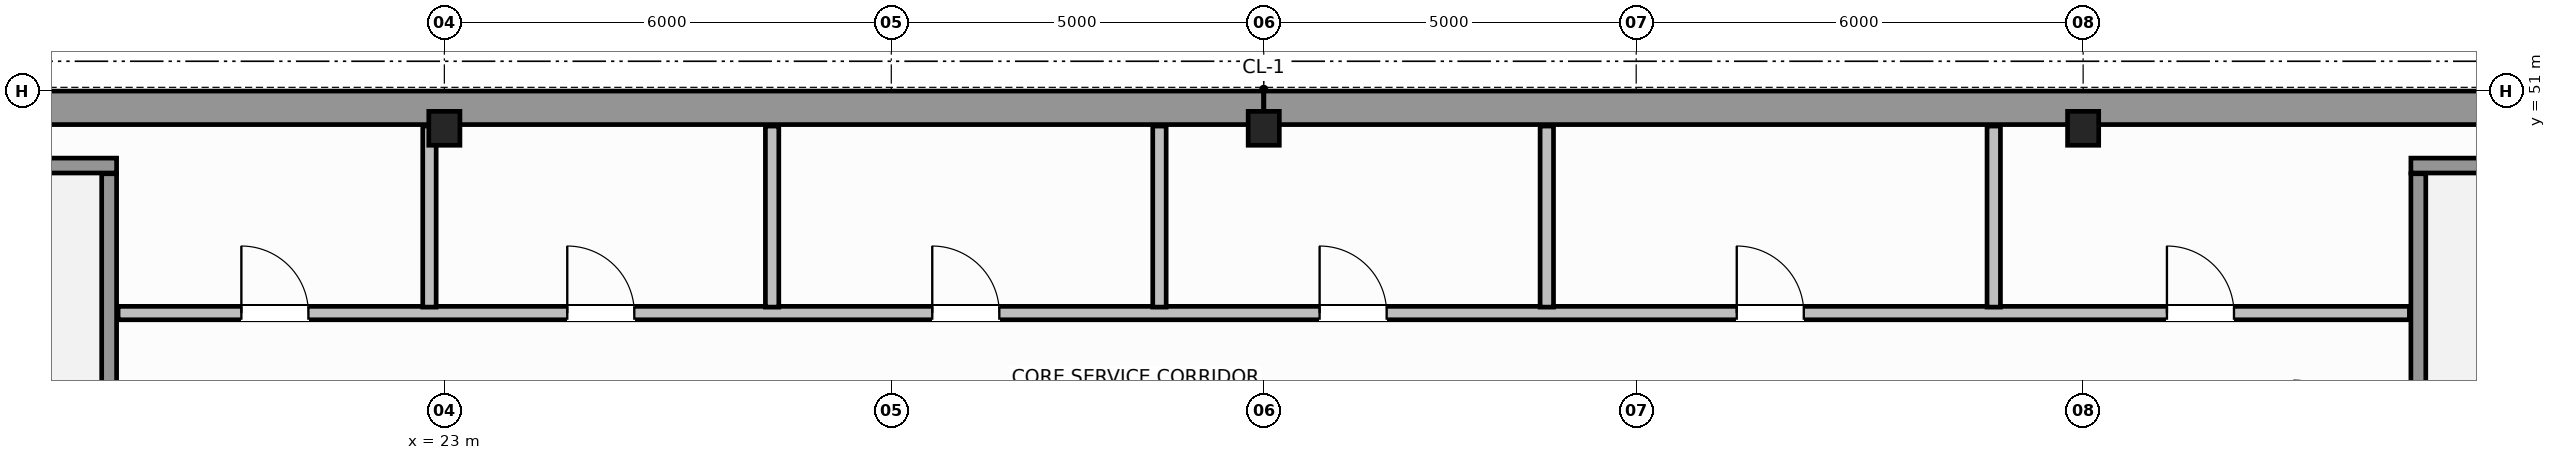
"""IFC4 building model, lengths in metres.
Left out: names, types, materials, properties, quantities, classifications, styles, units other than length and angle.
Written with IfcOpenShell. Run it as: python <this file> out.ifc"""

import sys

from ifc_helpers import new_model, si_unit, direction, frame, frame_2d, origin, origin_2d, place, context, subcontext, project, spatial, rectangle, i_section, extrude, source, transform, mapped, element, fill, save


model = new_model("IFC4")
c1 = context("Model", 3, precision=1e-05, world=origin(), true_north=direction((0.0, 1.0)))
c2 = subcontext(c1, "Body", "Model", "MODEL_VIEW")
j1 = project(units=[si_unit("LENGTHUNIT", "METRE"), si_unit("PLANEANGLEUNIT", "RADIAN")], contexts=[c1])
p1 = place(None, origin())
s1 = spatial("IfcSite", under=j1, at=p1, CompositionType="ELEMENT")
p2 = place(p1, origin())
s2 = spatial("IfcBuilding", under=s1, at=p2, CompositionType="ELEMENT")
p3 = place(p2, frame((0.0, 0.0, 249.8)))
s3 = spatial("IfcBuildingStorey", under=s2, at=p3, CompositionType="ELEMENT", Elevation=249.8)
m1 = source(origin(), c2, "Body", "SweptSolid", [
    extrude(i_section(OverallWidth=0.418, OverallDepth=0.455, WebThickness=0.042, FlangeThickness=0.058, FilletRadius=0.015, at=origin_2d()), origin(), (0.0, 0.0, 1.0), 3.8),
])
for number, where, z_axis, x_axis in (
    (1, (23.0, 50.5, 0.0), (0.0, 0.0, 1.0), (1.0, 0.0, 0.0)),
    (2, (34.0, 50.5, 0.0), (0.0, 0.0, 1.0), (1.0, 0.0, 0.0)),
    (3, (45.0, 50.5, 0.0), (0.0, 0.0, 1.0), (1.0, 0.0, 0.0)),
):
    element("IfcColumn", number, at=place(p3, frame(where, z_axis=z_axis, x_axis=x_axis)), inside=s3, PredefinedType="COLUMN", context=c2, shape_type="MappedRepresentation", body=[
        mapped(m1, transform((0.0, 0.0, 0.0), scale=1.0)),
    ])
for number, where, z_axis, x_axis in (
    (4, (14.229, 50.775, 0.0), (0.0, 0.0, 1.0), (1.0, 0.0, 0.0)),
    (5, (34.002, 50.775, 0.0), (0.0, 0.0, 1.0), (1.0, 0.0, 0.0)),
):
    element("IfcWall", number, at=place(p3, frame(where, z_axis=z_axis, x_axis=x_axis)), inside=s3, PredefinedType="SHEAR", context=c2, shape_type="SweptSolid", body=[
        extrude(rectangle(XDim=19.769, YDim=0.45, at=frame_2d((9.885, 0.0))), origin(), (0.0, 0.0, 1.0), 3.8),
    ])
p4 = place(p3, frame((14.225, 50.0, 0.0), z_axis=(0.0, 0.0, 1.0), x_axis=(1.0, 0.0, 0.0)))
e6 = element("IfcWall", 6, at=p4, inside=s3, PredefinedType="SOLIDWALL", context=c2, shape_type="SweptSolid", body=[
    extrude(rectangle(XDim=4.375, YDim=0.2, at=frame_2d((2.188, 0.0))), origin(), (0.0, 0.0, 1.0), 3.8),
])
p5 = place(p3, frame((18.5, 39.96, 0.0), z_axis=(0.0, 0.0, 1.0), x_axis=(0.0, 1.0, 0.0)))
e7 = element("IfcWall", 7, at=p5, inside=s3, PredefinedType="SOLIDWALL", context=c2, shape_type="SweptSolid", body=[
    extrude(rectangle(XDim=9.93, YDim=0.2, at=frame_2d((4.965, 0.0))), origin(), (0.0, 0.0, 1.0), 3.8),
])
p6 = place(p3, frame((49.4, 50.0, 0.0), z_axis=(0.0, 0.0, 1.0), x_axis=(1.0, 0.0, 0.0)))
e8 = element("IfcWall", 8, at=p6, inside=s3, PredefinedType="SOLIDWALL", context=c2, shape_type="SweptSolid", body=[
    extrude(rectangle(XDim=4.375, YDim=0.2, at=frame_2d((2.188, 0.0))), origin(), (0.0, 0.0, 1.0), 3.8),
])
p7 = place(p3, frame((49.5, 39.96, 0.0), z_axis=(0.0, 0.0, 1.0), x_axis=(0.0, 1.0, 0.0)))
e9 = element("IfcWall", 9, at=p7, inside=s3, PredefinedType="SOLIDWALL", context=c2, shape_type="SweptSolid", body=[
    extrude(rectangle(XDim=9.93, YDim=0.2, at=frame_2d((4.965, 0.0))), origin(), (0.0, 0.0, 1.0), 3.8),
])
p8 = place(p3, frame((18.62, 48.02, 0.0), z_axis=(0.0, 0.0, 1.0), x_axis=(1.0, 0.0, 0.0)))
e10 = element("IfcWall", 10, at=p8, inside=s3, PredefinedType="PLUMBINGWALL", context=c2, shape_type="SweptSolid", body=[
    extrude(rectangle(XDim=30.76, YDim=0.18, at=frame_2d((15.38, 0.0))), origin(), (0.0, 0.0, 1.0), 3.58),
])
p9 = place(p8, frame((1.655, 0.0, 0.0)))
e11 = element("IfcOpeningElement", 11, at=p9, cuts=e10, PredefinedType="OPENING", context=c2, shape_type="SweptSolid", body=[
    extrude(rectangle(XDim=0.9, YDim=2.15, at=frame_2d((0.45, 1.075))), frame((0.0, 0.1, 0.0), z_axis=(0.0, -1.0, 0.0), x_axis=(1.0, 0.0, 0.0)), (0.0, 0.0, 1.0), 0.2),
])
p10 = place(p8, frame((6.03, 0.0, 0.0)))
e12 = element("IfcOpeningElement", 12, at=p10, cuts=e10, PredefinedType="OPENING", context=c2, shape_type="SweptSolid", body=[
    extrude(rectangle(XDim=0.9, YDim=2.15, at=frame_2d((0.45, 1.075))), frame((0.0, 0.1, 0.0), z_axis=(0.0, -1.0, 0.0), x_axis=(1.0, 0.0, 0.0)), (0.0, 0.0, 1.0), 0.2),
])
p11 = place(p8, frame((10.93, 0.0, 0.0)))
e13 = element("IfcOpeningElement", 13, at=p11, cuts=e10, PredefinedType="OPENING", context=c2, shape_type="SweptSolid", body=[
    extrude(rectangle(XDim=0.9, YDim=2.15, at=frame_2d((0.45, 1.075))), frame((0.0, 0.1, 0.0), z_axis=(0.0, -1.0, 0.0), x_axis=(1.0, 0.0, 0.0)), (0.0, 0.0, 1.0), 0.2),
])
p12 = place(p8, frame((16.13, 0.0, 0.0)))
e14 = element("IfcOpeningElement", 14, at=p12, cuts=e10, PredefinedType="OPENING", context=c2, shape_type="SweptSolid", body=[
    extrude(rectangle(XDim=0.9, YDim=2.15, at=frame_2d((0.45, 1.075))), frame((0.0, 0.1, 0.0), z_axis=(0.0, -1.0, 0.0), x_axis=(1.0, 0.0, 0.0)), (0.0, 0.0, 1.0), 0.2),
])
p13 = place(p8, frame((21.73, 0.0, 0.0)))
e15 = element("IfcOpeningElement", 15, at=p13, cuts=e10, PredefinedType="OPENING", context=c2, shape_type="SweptSolid", body=[
    extrude(rectangle(XDim=0.9, YDim=2.15, at=frame_2d((0.45, 1.075))), frame((0.0, 0.1, 0.0), z_axis=(0.0, -1.0, 0.0), x_axis=(1.0, 0.0, 0.0)), (0.0, 0.0, 1.0), 0.2),
])
p14 = place(p8, frame((27.505, 0.0, 0.0)))
e16 = element("IfcOpeningElement", 16, at=p14, cuts=e10, PredefinedType="OPENING", context=c2, shape_type="SweptSolid", body=[
    extrude(rectangle(XDim=0.9, YDim=2.15, at=frame_2d((0.45, 1.075))), frame((0.0, 0.1, 0.0), z_axis=(0.0, -1.0, 0.0), x_axis=(1.0, 0.0, 0.0)), (0.0, 0.0, 1.0), 0.2),
])
p15 = place(p3, frame((22.8, 48.1, 0.0), z_axis=(0.0, 0.0, 1.0), x_axis=(0.0, 1.0, 0.0)))
e17 = element("IfcWall", 17, at=p15, inside=s3, PredefinedType="PLUMBINGWALL", context=c2, shape_type="SweptSolid", body=[
    extrude(rectangle(XDim=2.43, YDim=0.18, at=frame_2d((1.215, 0.0))), origin(), (0.0, 0.0, 1.0), 3.02),
])
for number, where, z_axis, x_axis in (
    (18, (27.4, 48.1, 0.0), (0.0, 0.0, 1.0), (0.0, 1.0, 0.0)),
    (19, (32.6, 48.1, 0.0), (0.0, 0.0, 1.0), (0.0, 1.0, 0.0)),
    (20, (37.8, 48.1, 0.0), (0.0, 0.0, 1.0), (0.0, 1.0, 0.0)),
    (21, (43.8, 48.1, 0.0), (0.0, 0.0, 1.0), (0.0, 1.0, 0.0)),
):
    element("IfcWall", number, at=place(p3, frame(where, z_axis=z_axis, x_axis=x_axis)), inside=s3, PredefinedType="PLUMBINGWALL", context=c2, shape_type="SweptSolid", body=[
        extrude(rectangle(XDim=2.43, YDim=0.18, at=frame_2d((1.215, 0.0))), origin(), (0.0, 0.0, 1.0), 3.58),
    ])
m2 = source(origin(), c2, "Body", "SweptSolid", [
    extrude(rectangle(XDim=0.9, YDim=2.15, at=frame_2d((0.45, 1.075))), frame((0.0, 0.025, 0.0), z_axis=(0.0, -1.0, 0.0), x_axis=(1.0, 0.0, 0.0)), (0.0, 0.0, 1.0), 0.05),
])
p16 = place(p9, origin())
e22 = element("IfcDoor", 22, at=p16, inside=s3, OperationType="SINGLE_SWING_LEFT", PredefinedType="DOOR", context=c2, shape_type="MappedRepresentation", body=[
    mapped(m2, transform((0.0, 0.0, 0.0), scale=1.0)),
])
fill(e11, e22)
p17 = place(p10, origin())
e23 = element("IfcDoor", 23, at=p17, inside=s3, OperationType="SINGLE_SWING_RIGHT", PredefinedType="DOOR", context=c2, shape_type="MappedRepresentation", body=[
    mapped(m2, transform((0.0, 0.0, 0.0), scale=1.0)),
])
fill(e12, e23)
p18 = place(p11, origin())
e24 = element("IfcDoor", 24, at=p18, inside=s3, OperationType="SINGLE_SWING_LEFT", PredefinedType="DOOR", context=c2, shape_type="MappedRepresentation", body=[
    mapped(m2, transform((0.0, 0.0, 0.0), scale=1.0)),
])
fill(e13, e24)
p19 = place(p12, origin())
e25 = element("IfcDoor", 25, at=p19, inside=s3, OperationType="SINGLE_SWING_RIGHT", PredefinedType="DOOR", context=c2, shape_type="MappedRepresentation", body=[
    mapped(m2, transform((0.0, 0.0, 0.0), scale=1.0)),
])
fill(e14, e25)
p20 = place(p13, origin())
e26 = element("IfcDoor", 26, at=p20, inside=s3, OperationType="SINGLE_SWING_LEFT", PredefinedType="DOOR", context=c2, shape_type="MappedRepresentation", body=[
    mapped(m2, transform((0.0, 0.0, 0.0), scale=1.0)),
])
fill(e15, e26)
p21 = place(p14, origin())
e27 = element("IfcDoor", 27, at=p21, inside=s3, OperationType="SINGLE_SWING_RIGHT", PredefinedType="DOOR", context=c2, shape_type="MappedRepresentation", body=[
    mapped(m2, transform((0.0, 0.0, 0.0), scale=1.0)),
])
fill(e16, e27)
save(model, sys.argv[1])
